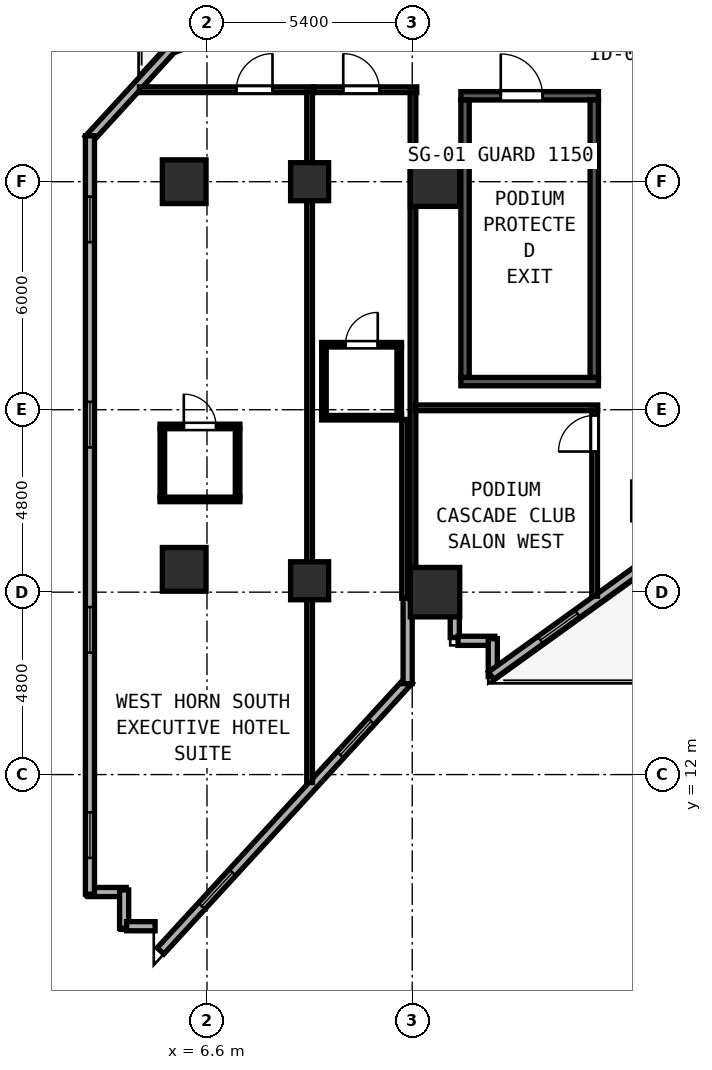
"""IFC4 building model, lengths in metres.
Left out: names, types, materials, properties, quantities, classifications, styles, units other than length and angle.
Written with IfcOpenShell. Run it as: python <this file> out.ifc"""

import sys

from ifc_helpers import new_model, si_unit, direction, frame, frame_2d, origin, origin_2d, place, context, subcontext, project, spatial, rectangle, hollow_rectangle, extrude, element, fill, save


model = new_model("IFC4")
c1 = context("Model", 3, precision=1e-05, world=origin(), true_north=direction((0.0, 1.0)))
c2 = subcontext(c1, "Body", "Model", "MODEL_VIEW")
j1 = project(units=[si_unit("LENGTHUNIT", "METRE"), si_unit("PLANEANGLEUNIT", "RADIAN")], contexts=[c1])
p1 = place(None, origin())
s1 = spatial("IfcSite", under=j1, at=p1, CompositionType="ELEMENT")
p2 = place(p1, origin())
s2 = spatial("IfcBuilding", under=s1, at=p2, CompositionType="ELEMENT")
p3 = place(p2, frame((0.0, 0.0, 24.0)))
s3 = spatial("IfcBuildingStorey", under=s2, at=p3, CompositionType="ELEMENT", Elevation=24.0)
p4 = place(p3, frame((13.28, 29.86, 0.0), z_axis=(0.0, 0.0, 1.0), x_axis=(1.0, 0.0, 0.0)))
e1 = element("IfcWall", 1, at=p4, inside=s3, PredefinedType="SHEAR", context=c2, shape_type="SweptSolid", body=[
    extrude(rectangle(XDim=3.62, YDim=0.22, at=frame_2d((1.81, 0.0))), origin(), (0.0, 0.0, 1.0), 3.6),
])
p5 = place(p4, frame((1.05, 0.0, 0.0)))
e2 = element("IfcOpeningElement", 2, at=p5, cuts=e1, PredefinedType="OPENING", context=c2, shape_type="SweptSolid", body=[
    extrude(rectangle(XDim=1.1, YDim=2.15, at=frame_2d((0.55, 1.075))), frame((0.0, 0.12, 0.0), z_axis=(0.0, -1.0, 0.0), x_axis=(1.0, 0.0, 0.0)), (0.0, 0.0, 1.0), 0.24),
])
p6 = place(p3, frame((13.28, 22.34, 0.0), z_axis=(0.0, 0.0, 1.0), x_axis=(1.0, 0.0, 0.0)))
e3 = element("IfcWall", 3, at=p6, inside=s3, PredefinedType="SHEAR", context=c2, shape_type="SweptSolid", body=[
    extrude(rectangle(XDim=3.62, YDim=0.22, at=frame_2d((1.81, 0.0))), origin(), (0.0, 0.0, 1.0), 3.6),
])
for number, where, z_axis, x_axis in (
    (4, (13.39, 22.45, 0.0), (0.0, 0.0, 1.0), (0.0, 1.0, 0.0)),
    (5, (16.79, 22.45, 0.0), (0.0, 0.0, 1.0), (0.0, 1.0, 0.0)),
):
    element("IfcWall", number, at=place(p3, frame(where, z_axis=z_axis, x_axis=x_axis)), inside=s3, PredefinedType="SHEAR", context=c2, shape_type="SweptSolid", body=[
        extrude(rectangle(XDim=7.3, YDim=0.22, at=frame_2d((3.65, 0.0))), origin(), (0.0, 0.0, 1.0), 3.6),
    ])
for number, where, z_axis, x_axis in (
    (6, (12.6, 16.8, 0.0), (0.0, 0.0, 1.0), (1.0, 0.0, 0.0)),
    (7, (12.6, 27.6, 0.0), (0.0, 0.0, 1.0), (1.0, 0.0, 0.0)),
):
    element("IfcColumn", number, at=place(p3, frame(where, z_axis=z_axis, x_axis=x_axis)), inside=s3, PredefinedType="COLUMN", context=c2, shape_type="SweptSolid", body=[
        extrude(hollow_rectangle(XDim=1.3, YDim=1.3, WallThickness=0.048, at=origin_2d()), origin(), (0.0, 0.0, 1.0), 3.8),
    ])
for number, where, z_axis, x_axis in (
    (8, (6.0, 17.4, 0.0), (0.0, 0.0, 1.0), (1.0, 0.0, 0.0)),
    (9, (6.0, 27.6, 0.0), (0.0, 0.0, 1.0), (1.0, 0.0, 0.0)),
):
    element("IfcColumn", number, at=place(p3, frame(where, z_axis=z_axis, x_axis=x_axis)), inside=s3, PredefinedType="COLUMN", context=c2, shape_type="SweptSolid", body=[
        extrude(hollow_rectangle(XDim=1.15, YDim=1.15, WallThickness=0.042, at=origin_2d()), origin(), (0.0, 0.0, 1.0), 3.8),
    ])
for number, where, z_axis, x_axis in (
    (10, (9.3, 17.1, -0.26), (0.0, 0.0, 1.0), (1.0, 0.0, 0.0)),
    (11, (9.3, 27.6, -0.26), (0.0, 0.0, 1.0), (1.0, 0.0, 0.0)),
):
    element("IfcColumn", number, at=place(p3, frame(where, z_axis=z_axis, x_axis=x_axis)), inside=s3, PredefinedType="COLUMN", context=c2, shape_type="SweptSolid", body=[
        extrude(hollow_rectangle(XDim=1.0, YDim=1.0, WallThickness=0.038, at=origin_2d()), origin(), (0.0, 0.0, 1.0), 4.06),
    ])
for number, where, z_axis, x_axis in (
    (12, (3.465, 8.91, 0.0), (0.0, 0.0, 1.0), (1.0, 0.0, 0.0)),
    (13, (4.42, 8.965, 0.0), (0.0, 0.0, 1.0), (0.0, -1.0, 0.0)),
):
    element("IfcWall", number, at=place(p3, frame(where, z_axis=z_axis, x_axis=x_axis)), inside=s3, PredefinedType="SOLIDWALL", context=c2, shape_type="SweptSolid", body=[
        extrude(rectangle(XDim=1.01, YDim=0.24, at=frame_2d((0.505, 0.0))), origin(), (0.0, 0.0, 1.0), 3.6),
    ])
p7 = place(p3, frame((4.485, 8.01, 0.0), z_axis=(0.0, 0.0, 1.0), x_axis=(1.0, 0.0, 0.0)))
e14 = element("IfcWall", 14, at=p7, inside=s3, PredefinedType="SOLIDWALL", context=c2, shape_type="SweptSolid", body=[
    extrude(rectangle(XDim=0.75, YDim=0.24, at=frame_2d((0.375, 0.0))), origin(), (0.0, 0.0, 1.0), 3.6),
])
p8 = place(p3, frame((5.377, 7.361, 0.0), z_axis=(0.0, 0.0, 1.0), x_axis=(0.676129143807, 0.736783130165, 0.0)))
e15 = element("IfcWall", 15, at=p8, inside=s3, PredefinedType="SOLIDWALL", context=c2, shape_type="SweptSolid", body=[
    extrude(rectangle(XDim=9.672, YDim=0.24, at=frame_2d((4.836, 0.0))), origin(), (0.0, 0.0, 1.0), 3.6),
])
p9 = place(p8, frame((1.6, 0.0, 0.85)))
e16 = element("IfcOpeningElement", 16, at=p9, cuts=e15, PredefinedType="OPENING", context=c2, shape_type="SweptSolid", body=[
    extrude(rectangle(XDim=1.2, YDim=1.85, at=frame_2d((0.6, 0.925))), frame((0.0, 0.13, 0.0), z_axis=(0.0, -1.0, 0.0), x_axis=(1.0, 0.0, 0.0)), (0.0, 0.0, 1.0), 0.26),
])
p10 = place(p8, frame((7.0, 0.0, 0.85)))
e17 = element("IfcOpeningElement", 17, at=p10, cuts=e15, PredefinedType="OPENING", context=c2, shape_type="SweptSolid", body=[
    extrude(rectangle(XDim=1.2, YDim=1.85, at=frame_2d((0.6, 0.925))), frame((0.0, 0.13, 0.0), z_axis=(0.0, -1.0, 0.0), x_axis=(1.0, 0.0, 0.0)), (0.0, 0.0, 1.0), 0.26),
])
p11 = place(p3, frame((11.88, 14.392, 0.0), z_axis=(0.0, 0.0, 1.0), x_axis=(0.0, 1.0, 0.0)))
e18 = element("IfcWall", 18, at=p11, inside=s3, PredefinedType="SOLIDWALL", context=c2, shape_type="SweptSolid", body=[
    extrude(rectangle(XDim=2.248, YDim=0.24, at=frame_2d((1.124, 0.0))), origin(), (0.0, 0.0, 1.0), 3.6),
])
p12 = place(p3, frame((13.12, 16.158, 0.0), z_axis=(0.0, 0.0, 1.0), x_axis=(0.0, -1.0, 0.0)))
e19 = element("IfcWall", 19, at=p12, inside=s3, PredefinedType="SOLIDWALL", context=c2, shape_type="SweptSolid", body=[
    extrude(rectangle(XDim=0.553, YDim=0.24, at=frame_2d((0.276, 0.0))), origin(), (0.0, 0.0, 1.0), 3.6),
])
p13 = place(p3, frame((13.205, 15.52, 0.0), z_axis=(0.0, 0.0, 1.0), x_axis=(1.0, 0.0, 0.0)))
e20 = element("IfcWall", 20, at=p13, inside=s3, PredefinedType="SOLIDWALL", context=c2, shape_type="SweptSolid", body=[
    extrude(rectangle(XDim=0.97, YDim=0.24, at=frame_2d((0.485, 0.0))), origin(), (0.0, 0.0, 1.0), 3.6),
])
p14 = place(p3, frame((14.12, 15.575, 0.0), z_axis=(0.0, 0.0, 1.0), x_axis=(0.0, -1.0, 0.0)))
e21 = element("IfcWall", 21, at=p14, inside=s3, PredefinedType="SOLIDWALL", context=c2, shape_type="SweptSolid", body=[
    extrude(rectangle(XDim=0.996, YDim=0.24, at=frame_2d((0.498, 0.0))), origin(), (0.0, 0.0, 1.0), 3.6),
])
p15 = place(p3, frame((14.075, 14.602, 0.0), z_axis=(0.0, 0.0, 1.0), x_axis=(0.811535555989, 0.584303038984, 0.0)))
e22 = element("IfcWall", 22, at=p15, inside=s3, PredefinedType="SOLIDWALL", context=c2, shape_type="SweptSolid", body=[
    extrude(rectangle(XDim=11.438, YDim=0.24, at=frame_2d((5.719, 0.0))), origin(), (0.0, 0.0, 1.0), 3.097),
])
p16 = place(p15, frame((1.6, 0.0, 0.85)))
e23 = element("IfcOpeningElement", 23, at=p16, cuts=e22, PredefinedType="OPENING", context=c2, shape_type="SweptSolid", body=[
    extrude(rectangle(XDim=1.2, YDim=1.85, at=frame_2d((0.6, 0.925))), frame((0.0, 0.13, 0.0), z_axis=(0.0, -1.0, 0.0), x_axis=(1.0, 0.0, 0.0)), (0.0, 0.0, 1.0), 0.26),
])
p17 = place(p15, frame((7.0, 0.0, 0.85)))
e24 = element("IfcOpeningElement", 24, at=p17, cuts=e22, PredefinedType="OPENING", context=c2, shape_type="SweptSolid", body=[
    extrude(rectangle(XDim=1.2, YDim=1.85, at=frame_2d((0.6, 0.925))), frame((0.0, 0.13, 0.0), z_axis=(0.0, -1.0, 0.0), x_axis=(1.0, 0.0, 0.0)), (0.0, 0.0, 1.0), 0.26),
])
p18 = place(p3, frame((12.171, 33.536, 0.0), z_axis=(0.0, 0.0, 1.0), x_axis=(-0.936327744176, -0.351127263946, 0.0)))
e25 = element("IfcWall", 25, at=p18, inside=s3, PredefinedType="SOLIDWALL", context=c2, shape_type="SweptSolid", body=[
    extrude(rectangle(XDim=7.0, YDim=0.24, at=frame_2d((3.5, 0.0))), origin(), (0.0, 0.0, 1.0), 3.6),
])
p19 = place(p18, frame((1.6, 0.0, 0.85)))
e26 = element("IfcOpeningElement", 26, at=p19, cuts=e25, PredefinedType="OPENING", context=c2, shape_type="SweptSolid", body=[
    extrude(rectangle(XDim=1.2, YDim=1.85, at=frame_2d((0.6, 0.925))), frame((0.0, 0.13, 0.0), z_axis=(0.0, -1.0, 0.0), x_axis=(1.0, 0.0, 0.0)), (0.0, 0.0, 1.0), 0.26),
])
p20 = place(p3, frame((5.706, 31.138, 0.0), z_axis=(0.0, 0.0, 1.0), x_axis=(-0.675758228752, -0.737123338577, 0.0)))
e27 = element("IfcWall", 27, at=p20, inside=s3, PredefinedType="SOLIDWALL", context=c2, shape_type="SweptSolid", body=[
    extrude(rectangle(XDim=3.29, YDim=0.24, at=frame_2d((1.645, 0.0))), origin(), (0.0, 0.0, 1.0), 3.6),
])
p21 = place(p3, frame((3.52, 28.808, 0.0), z_axis=(0.0, 0.0, 1.0), x_axis=(0.0, -1.0, 0.0)))
e28 = element("IfcWall", 28, at=p21, inside=s3, PredefinedType="SOLIDWALL", context=c2, shape_type="SweptSolid", body=[
    extrude(rectangle(XDim=19.953, YDim=0.24, at=frame_2d((9.977, 0.0))), origin(), (0.0, 0.0, 1.0), 3.6),
])
p22 = place(p21, frame((1.6, 0.0, 0.85)))
e29 = element("IfcOpeningElement", 29, at=p22, cuts=e28, PredefinedType="OPENING", context=c2, shape_type="SweptSolid", body=[
    extrude(rectangle(XDim=1.2, YDim=1.85, at=frame_2d((0.6, 0.925))), frame((0.0, 0.13, 0.0), z_axis=(0.0, -1.0, 0.0), x_axis=(1.0, 0.0, 0.0)), (0.0, 0.0, 1.0), 0.26),
])
p23 = place(p21, frame((7.0, 0.0, 0.85)))
e30 = element("IfcOpeningElement", 30, at=p23, cuts=e28, PredefinedType="OPENING", context=c2, shape_type="SweptSolid", body=[
    extrude(rectangle(XDim=1.2, YDim=1.85, at=frame_2d((0.6, 0.925))), frame((0.0, 0.13, 0.0), z_axis=(0.0, -1.0, 0.0), x_axis=(1.0, 0.0, 0.0)), (0.0, 0.0, 1.0), 0.26),
])
p24 = place(p21, frame((12.4, 0.0, 0.85)))
e31 = element("IfcOpeningElement", 31, at=p24, cuts=e28, PredefinedType="OPENING", context=c2, shape_type="SweptSolid", body=[
    extrude(rectangle(XDim=1.2, YDim=1.85, at=frame_2d((0.6, 0.925))), frame((0.0, 0.13, 0.0), z_axis=(0.0, -1.0, 0.0), x_axis=(1.0, 0.0, 0.0)), (0.0, 0.0, 1.0), 0.26),
])
p25 = place(p21, frame((17.8, 0.0, 0.85)))
e32 = element("IfcOpeningElement", 32, at=p25, cuts=e28, PredefinedType="OPENING", context=c2, shape_type="SweptSolid", body=[
    extrude(rectangle(XDim=1.2, YDim=1.85, at=frame_2d((0.6, 0.925))), frame((0.0, 0.13, 0.0), z_axis=(0.0, -1.0, 0.0), x_axis=(1.0, 0.0, 0.0)), (0.0, 0.0, 1.0), 0.26),
])
p26 = place(p3, frame((4.823, 30.02, 0.0), z_axis=(0.0, 0.0, 1.0), x_axis=(1.0, 0.0, 0.0)))
e33 = element("IfcWall", 33, at=p26, inside=s3, PredefinedType="PARTITIONING", context=c2, shape_type="SweptSolid", body=[
    extrude(rectangle(XDim=4.576, YDim=0.15, at=frame_2d((2.288, 0.0))), origin(), (0.0, 0.0, 1.0), 3.6),
])
p27 = place(p26, frame((3.5, 0.0, 0.0), z_axis=(0.0, 0.0, 1.0), x_axis=(-1.0, 0.0, 0.0)))
e34 = element("IfcOpeningElement", 34, at=p27, cuts=e33, PredefinedType="OPENING", context=c2, shape_type="SweptSolid", body=[
    extrude(rectangle(XDim=0.95, YDim=2.18, at=frame_2d((0.475, 1.09))), frame((0.0, 0.085, 0.0), z_axis=(0.0, -1.0, 0.0), x_axis=(1.0, 0.0, 0.0)), (0.0, 0.0, 1.0), 0.17),
])
p28 = place(p3, frame((9.3, 11.791, 0.0), z_axis=(0.0, 0.0, 1.0), x_axis=(0.0, 1.0, 0.0)))
e35 = element("IfcWall", 35, at=p28, inside=s3, PredefinedType="PARTITIONING", context=c2, shape_type="SweptSolid", body=[
    extrude(rectangle(XDim=18.169, YDim=0.15, at=frame_2d((9.085, 0.0))), origin(), (0.0, 0.0, 1.0), 3.6),
])
p29 = place(p3, frame((5.365, 21.16, 0.0), z_axis=(0.0, 0.0, 1.0), x_axis=(1.0, 0.0, 0.0)))
e36 = element("IfcWall", 36, at=p29, inside=s3, PredefinedType="PARTITIONING", context=c2, shape_type="SweptSolid", body=[
    extrude(rectangle(XDim=2.1, YDim=0.12, at=frame_2d((1.05, 0.0))), origin(), (0.0, 0.0, 1.0), 3.6),
])
p30 = place(p29, frame((1.475, 0.0, 0.0), z_axis=(0.0, 0.0, 1.0), x_axis=(-1.0, 0.0, 0.0)))
e37 = element("IfcOpeningElement", 37, at=p30, cuts=e36, PredefinedType="OPENING", context=c2, shape_type="SweptSolid", body=[
    extrude(rectangle(XDim=0.85, YDim=2.1, at=frame_2d((0.425, 1.05))), frame((0.0, 0.07, 0.0), z_axis=(0.0, -1.0, 0.0), x_axis=(1.0, 0.0, 0.0)), (0.0, 0.0, 1.0), 0.14),
])
p31 = place(p3, frame((5.365, 19.24, 0.0), z_axis=(0.0, 0.0, 1.0), x_axis=(1.0, 0.0, 0.0)))
e38 = element("IfcWall", 38, at=p31, inside=s3, PredefinedType="PARTITIONING", context=c2, shape_type="SweptSolid", body=[
    extrude(rectangle(XDim=2.1, YDim=0.12, at=frame_2d((1.05, 0.0))), origin(), (0.0, 0.0, 1.0), 3.6),
])
for number, where, z_axis, x_axis in (
    (39, (5.425, 19.285, 0.0), (0.0, 0.0, 1.0), (0.0, 1.0, 0.0)),
    (40, (7.405, 19.285, 0.0), (0.0, 0.0, 1.0), (0.0, 1.0, 0.0)),
):
    element("IfcWall", number, at=place(p3, frame(where, z_axis=z_axis, x_axis=x_axis)), inside=s3, PredefinedType="PARTITIONING", context=c2, shape_type="SweptSolid", body=[
        extrude(rectangle(XDim=1.83, YDim=0.12, at=frame_2d((0.915, 0.0))), origin(), (0.0, 0.0, 1.0), 3.6),
    ])
p32 = place(p3, frame((9.402, 30.02, 0.0), z_axis=(0.0, 0.0, 1.0), x_axis=(1.0, 0.0, 0.0)))
e41 = element("IfcWall", 41, at=p32, inside=s3, PredefinedType="PARTITIONING", context=c2, shape_type="SweptSolid", body=[
    extrude(rectangle(XDim=2.718, YDim=0.15, at=frame_2d((1.359, 0.0))), origin(), (0.0, 0.0, 1.0), 3.6),
])
p33 = place(p32, frame((1.733, 0.0, 0.0), z_axis=(0.0, 0.0, 1.0), x_axis=(-1.0, 0.0, 0.0)))
e42 = element("IfcOpeningElement", 42, at=p33, cuts=e41, PredefinedType="OPENING", context=c2, shape_type="SweptSolid", body=[
    extrude(rectangle(XDim=0.95, YDim=2.15, at=frame_2d((0.475, 1.075))), frame((0.0, 0.085, 0.0), z_axis=(0.0, -1.0, 0.0), x_axis=(1.0, 0.0, 0.0)), (0.0, 0.0, 1.0), 0.17),
])
p34 = place(p3, frame((12.02, 16.612, 0.0), z_axis=(0.0, 0.0, 1.0), x_axis=(0.0, 1.0, 0.0)))
e43 = element("IfcWall", 43, at=p34, inside=s3, PredefinedType="PARTITIONING", context=c2, shape_type="SweptSolid", body=[
    extrude(rectangle(XDim=13.348, YDim=0.15, at=frame_2d((6.674, 0.0))), origin(), (0.0, 0.0, 1.0), 3.6),
])
p35 = place(p3, frame((9.618, 23.31, 0.0), z_axis=(0.0, 0.0, 1.0), x_axis=(1.0, 0.0, 0.0)))
e44 = element("IfcWall", 44, at=p35, inside=s3, PredefinedType="PARTITIONING", context=c2, shape_type="SweptSolid", body=[
    extrude(rectangle(XDim=2.1, YDim=0.12, at=frame_2d((1.05, 0.0))), origin(), (0.0, 0.0, 1.0), 3.6),
])
p36 = place(p35, frame((1.475, 0.0, 0.0), z_axis=(0.0, 0.0, 1.0), x_axis=(-1.0, 0.0, 0.0)))
e45 = element("IfcOpeningElement", 45, at=p36, cuts=e44, PredefinedType="OPENING", context=c2, shape_type="SweptSolid", body=[
    extrude(rectangle(XDim=0.85, YDim=2.1, at=frame_2d((0.425, 1.05))), frame((0.0, 0.07, 0.0), z_axis=(0.0, -1.0, 0.0), x_axis=(1.0, 0.0, 0.0)), (0.0, 0.0, 1.0), 0.14),
])
p37 = place(p3, frame((9.618, 21.39, 0.0), z_axis=(0.0, 0.0, 1.0), x_axis=(1.0, 0.0, 0.0)))
e46 = element("IfcWall", 46, at=p37, inside=s3, PredefinedType="PARTITIONING", context=c2, shape_type="SweptSolid", body=[
    extrude(rectangle(XDim=2.1, YDim=0.12, at=frame_2d((1.05, 0.0))), origin(), (0.0, 0.0, 1.0), 3.6),
])
for number, where, z_axis, x_axis in (
    (47, (9.678, 21.435, 0.0), (0.0, 0.0, 1.0), (0.0, 1.0, 0.0)),
    (48, (11.658, 21.435, 0.0), (0.0, 0.0, 1.0), (0.0, 1.0, 0.0)),
):
    element("IfcWall", number, at=place(p3, frame(where, z_axis=z_axis, x_axis=x_axis)), inside=s3, PredefinedType="PARTITIONING", context=c2, shape_type="SweptSolid", body=[
        extrude(rectangle(XDim=1.83, YDim=0.12, at=frame_2d((0.915, 0.0))), origin(), (0.0, 0.0, 1.0), 3.6),
    ])
p38 = place(p3, frame((12.08, 21.65, 0.0), z_axis=(0.0, 0.0, 1.0), x_axis=(1.0, 0.0, 0.0)))
e49 = element("IfcWall", 49, at=p38, inside=s3, PredefinedType="PARTITIONING", context=c2, shape_type="SweptSolid", body=[
    extrude(rectangle(XDim=4.8, YDim=0.15, at=frame_2d((2.4, 0.0))), origin(), (0.0, 0.0, 1.0), 3.6),
])
p39 = place(p3, frame((11.8, 16.642, 0.0), z_axis=(0.0, 0.0, 1.0), x_axis=(0.0, 1.0, 0.0)))
e50 = element("IfcWall", 50, at=p39, inside=s3, PredefinedType="PARTITIONING", context=c2, shape_type="SweptSolid", body=[
    extrude(rectangle(XDim=4.703, YDim=0.15, at=frame_2d((2.352, 0.0))), origin(), (0.0, 0.0, 1.0), 3.6),
])
p40 = place(p3, frame((16.8, 16.693, 0.0), z_axis=(0.0, 0.0, 1.0), x_axis=(0.0, 1.0, 0.0)))
e51 = element("IfcWall", 51, at=p40, inside=s3, PredefinedType="PARTITIONING", context=c2, shape_type="SweptSolid", body=[
    extrude(rectangle(XDim=4.897, YDim=0.15, at=frame_2d((2.448, 0.0))), origin(), (0.0, 0.0, 1.0), 3.6),
])
p41 = place(p40, frame((4.757, 0.0, 0.0), z_axis=(0.0, 0.0, 1.0), x_axis=(-1.0, 0.0, 0.0)))
e52 = element("IfcOpeningElement", 52, at=p41, cuts=e51, PredefinedType="OPENING", context=c2, shape_type="SweptSolid", body=[
    extrude(rectangle(XDim=0.95, YDim=2.12, at=frame_2d((0.475, 1.06))), frame((0.0, 0.085, 0.0), z_axis=(0.0, -1.0, 0.0), x_axis=(1.0, 0.0, 0.0)), (0.0, 0.0, 1.0), 0.17),
])
p42 = place(p9, origin())
e53 = element("IfcWindow", 53, at=p42, inside=s3, PartitioningType="SINGLE_PANEL", PredefinedType="WINDOW", context=c2, shape_type="SweptSolid", body=[
    extrude(rectangle(XDim=1.2, YDim=1.85, at=frame_2d((0.6, 0.925))), frame((0.0, 0.03, 0.0), z_axis=(0.0, -1.0, 0.0), x_axis=(1.0, 0.0, 0.0)), (0.0, 0.0, 1.0), 0.06),
])
fill(e16, e53)
p43 = place(p10, origin())
e54 = element("IfcWindow", 54, at=p43, inside=s3, PartitioningType="SINGLE_PANEL", PredefinedType="WINDOW", context=c2, shape_type="SweptSolid", body=[
    extrude(rectangle(XDim=1.2, YDim=1.85, at=frame_2d((0.6, 0.925))), frame((0.0, 0.03, 0.0), z_axis=(0.0, -1.0, 0.0), x_axis=(1.0, 0.0, 0.0)), (0.0, 0.0, 1.0), 0.06),
])
fill(e17, e54)
p44 = place(p16, origin())
e55 = element("IfcWindow", 55, at=p44, inside=s3, PartitioningType="SINGLE_PANEL", PredefinedType="WINDOW", context=c2, shape_type="SweptSolid", body=[
    extrude(rectangle(XDim=1.2, YDim=1.85, at=frame_2d((0.6, 0.925))), frame((0.0, 0.03, 0.0), z_axis=(0.0, -1.0, 0.0), x_axis=(1.0, 0.0, 0.0)), (0.0, 0.0, 1.0), 0.06),
])
fill(e23, e55)
p45 = place(p22, origin())
e56 = element("IfcWindow", 56, at=p45, inside=s3, PartitioningType="SINGLE_PANEL", PredefinedType="WINDOW", context=c2, shape_type="SweptSolid", body=[
    extrude(rectangle(XDim=1.2, YDim=1.85, at=frame_2d((0.6, 0.925))), frame((0.0, 0.03, 0.0), z_axis=(0.0, -1.0, 0.0), x_axis=(1.0, 0.0, 0.0)), (0.0, 0.0, 1.0), 0.06),
])
fill(e29, e56)
p46 = place(p23, origin())
e57 = element("IfcWindow", 57, at=p46, inside=s3, PartitioningType="SINGLE_PANEL", PredefinedType="WINDOW", context=c2, shape_type="SweptSolid", body=[
    extrude(rectangle(XDim=1.2, YDim=1.85, at=frame_2d((0.6, 0.925))), frame((0.0, 0.03, 0.0), z_axis=(0.0, -1.0, 0.0), x_axis=(1.0, 0.0, 0.0)), (0.0, 0.0, 1.0), 0.06),
])
fill(e30, e57)
p47 = place(p24, origin())
e58 = element("IfcWindow", 58, at=p47, inside=s3, PartitioningType="SINGLE_PANEL", PredefinedType="WINDOW", context=c2, shape_type="SweptSolid", body=[
    extrude(rectangle(XDim=1.2, YDim=1.85, at=frame_2d((0.6, 0.925))), frame((0.0, 0.03, 0.0), z_axis=(0.0, -1.0, 0.0), x_axis=(1.0, 0.0, 0.0)), (0.0, 0.0, 1.0), 0.06),
])
fill(e31, e58)
p48 = place(p25, origin())
e59 = element("IfcWindow", 59, at=p48, inside=s3, PartitioningType="SINGLE_PANEL", PredefinedType="WINDOW", context=c2, shape_type="SweptSolid", body=[
    extrude(rectangle(XDim=1.2, YDim=1.85, at=frame_2d((0.6, 0.925))), frame((0.0, 0.03, 0.0), z_axis=(0.0, -1.0, 0.0), x_axis=(1.0, 0.0, 0.0)), (0.0, 0.0, 1.0), 0.06),
])
fill(e32, e59)
p49 = place(p5, origin())
e60 = element("IfcDoor", 60, at=p49, inside=s3, OperationType="SINGLE_SWING_LEFT", PredefinedType="DOOR", context=c2, shape_type="SweptSolid", body=[
    extrude(rectangle(XDim=1.1, YDim=2.15, at=frame_2d((0.55, 1.075))), frame((0.0, 0.025, 0.0), z_axis=(0.0, -1.0, 0.0), x_axis=(1.0, 0.0, 0.0)), (0.0, 0.0, 1.0), 0.05),
])
fill(e2, e60)
p50 = place(p27, origin())
e61 = element("IfcDoor", 61, at=p50, inside=s3, OperationType="SINGLE_SWING_LEFT", PredefinedType="DOOR", context=c2, shape_type="SweptSolid", body=[
    extrude(rectangle(XDim=0.95, YDim=2.18, at=frame_2d((0.475, 1.09))), frame((0.0, 0.025, 0.0), z_axis=(0.0, -1.0, 0.0), x_axis=(1.0, 0.0, 0.0)), (0.0, 0.0, 1.0), 0.05),
])
fill(e34, e61)
p51 = place(p30, origin())
e62 = element("IfcDoor", 62, at=p51, inside=s3, OperationType="SINGLE_SWING_RIGHT", PredefinedType="DOOR", context=c2, shape_type="SweptSolid", body=[
    extrude(rectangle(XDim=0.85, YDim=2.1, at=frame_2d((0.425, 1.05))), frame((0.0, 0.025, 0.0), z_axis=(0.0, -1.0, 0.0), x_axis=(1.0, 0.0, 0.0)), (0.0, 0.0, 1.0), 0.05),
])
fill(e37, e62)
p52 = place(p33, origin())
e63 = element("IfcDoor", 63, at=p52, inside=s3, OperationType="SINGLE_SWING_RIGHT", PredefinedType="DOOR", context=c2, shape_type="SweptSolid", body=[
    extrude(rectangle(XDim=0.95, YDim=2.15, at=frame_2d((0.475, 1.075))), frame((0.0, 0.025, 0.0), z_axis=(0.0, -1.0, 0.0), x_axis=(1.0, 0.0, 0.0)), (0.0, 0.0, 1.0), 0.05),
])
fill(e42, e63)
p53 = place(p36, origin())
e64 = element("IfcDoor", 64, at=p53, inside=s3, OperationType="SINGLE_SWING_LEFT", PredefinedType="DOOR", context=c2, shape_type="SweptSolid", body=[
    extrude(rectangle(XDim=0.85, YDim=2.1, at=frame_2d((0.425, 1.05))), frame((0.0, 0.025, 0.0), z_axis=(0.0, -1.0, 0.0), x_axis=(1.0, 0.0, 0.0)), (0.0, 0.0, 1.0), 0.05),
])
fill(e45, e64)
p54 = place(p41, origin())
e65 = element("IfcDoor", 65, at=p54, inside=s3, OperationType="SINGLE_SWING_RIGHT", PredefinedType="DOOR", context=c2, shape_type="SweptSolid", body=[
    extrude(rectangle(XDim=0.95, YDim=2.12, at=frame_2d((0.475, 1.06))), frame((0.0, 0.025, 0.0), z_axis=(0.0, -1.0, 0.0), x_axis=(1.0, 0.0, 0.0)), (0.0, 0.0, 1.0), 0.05),
])
fill(e52, e65)
save(model, sys.argv[1])
